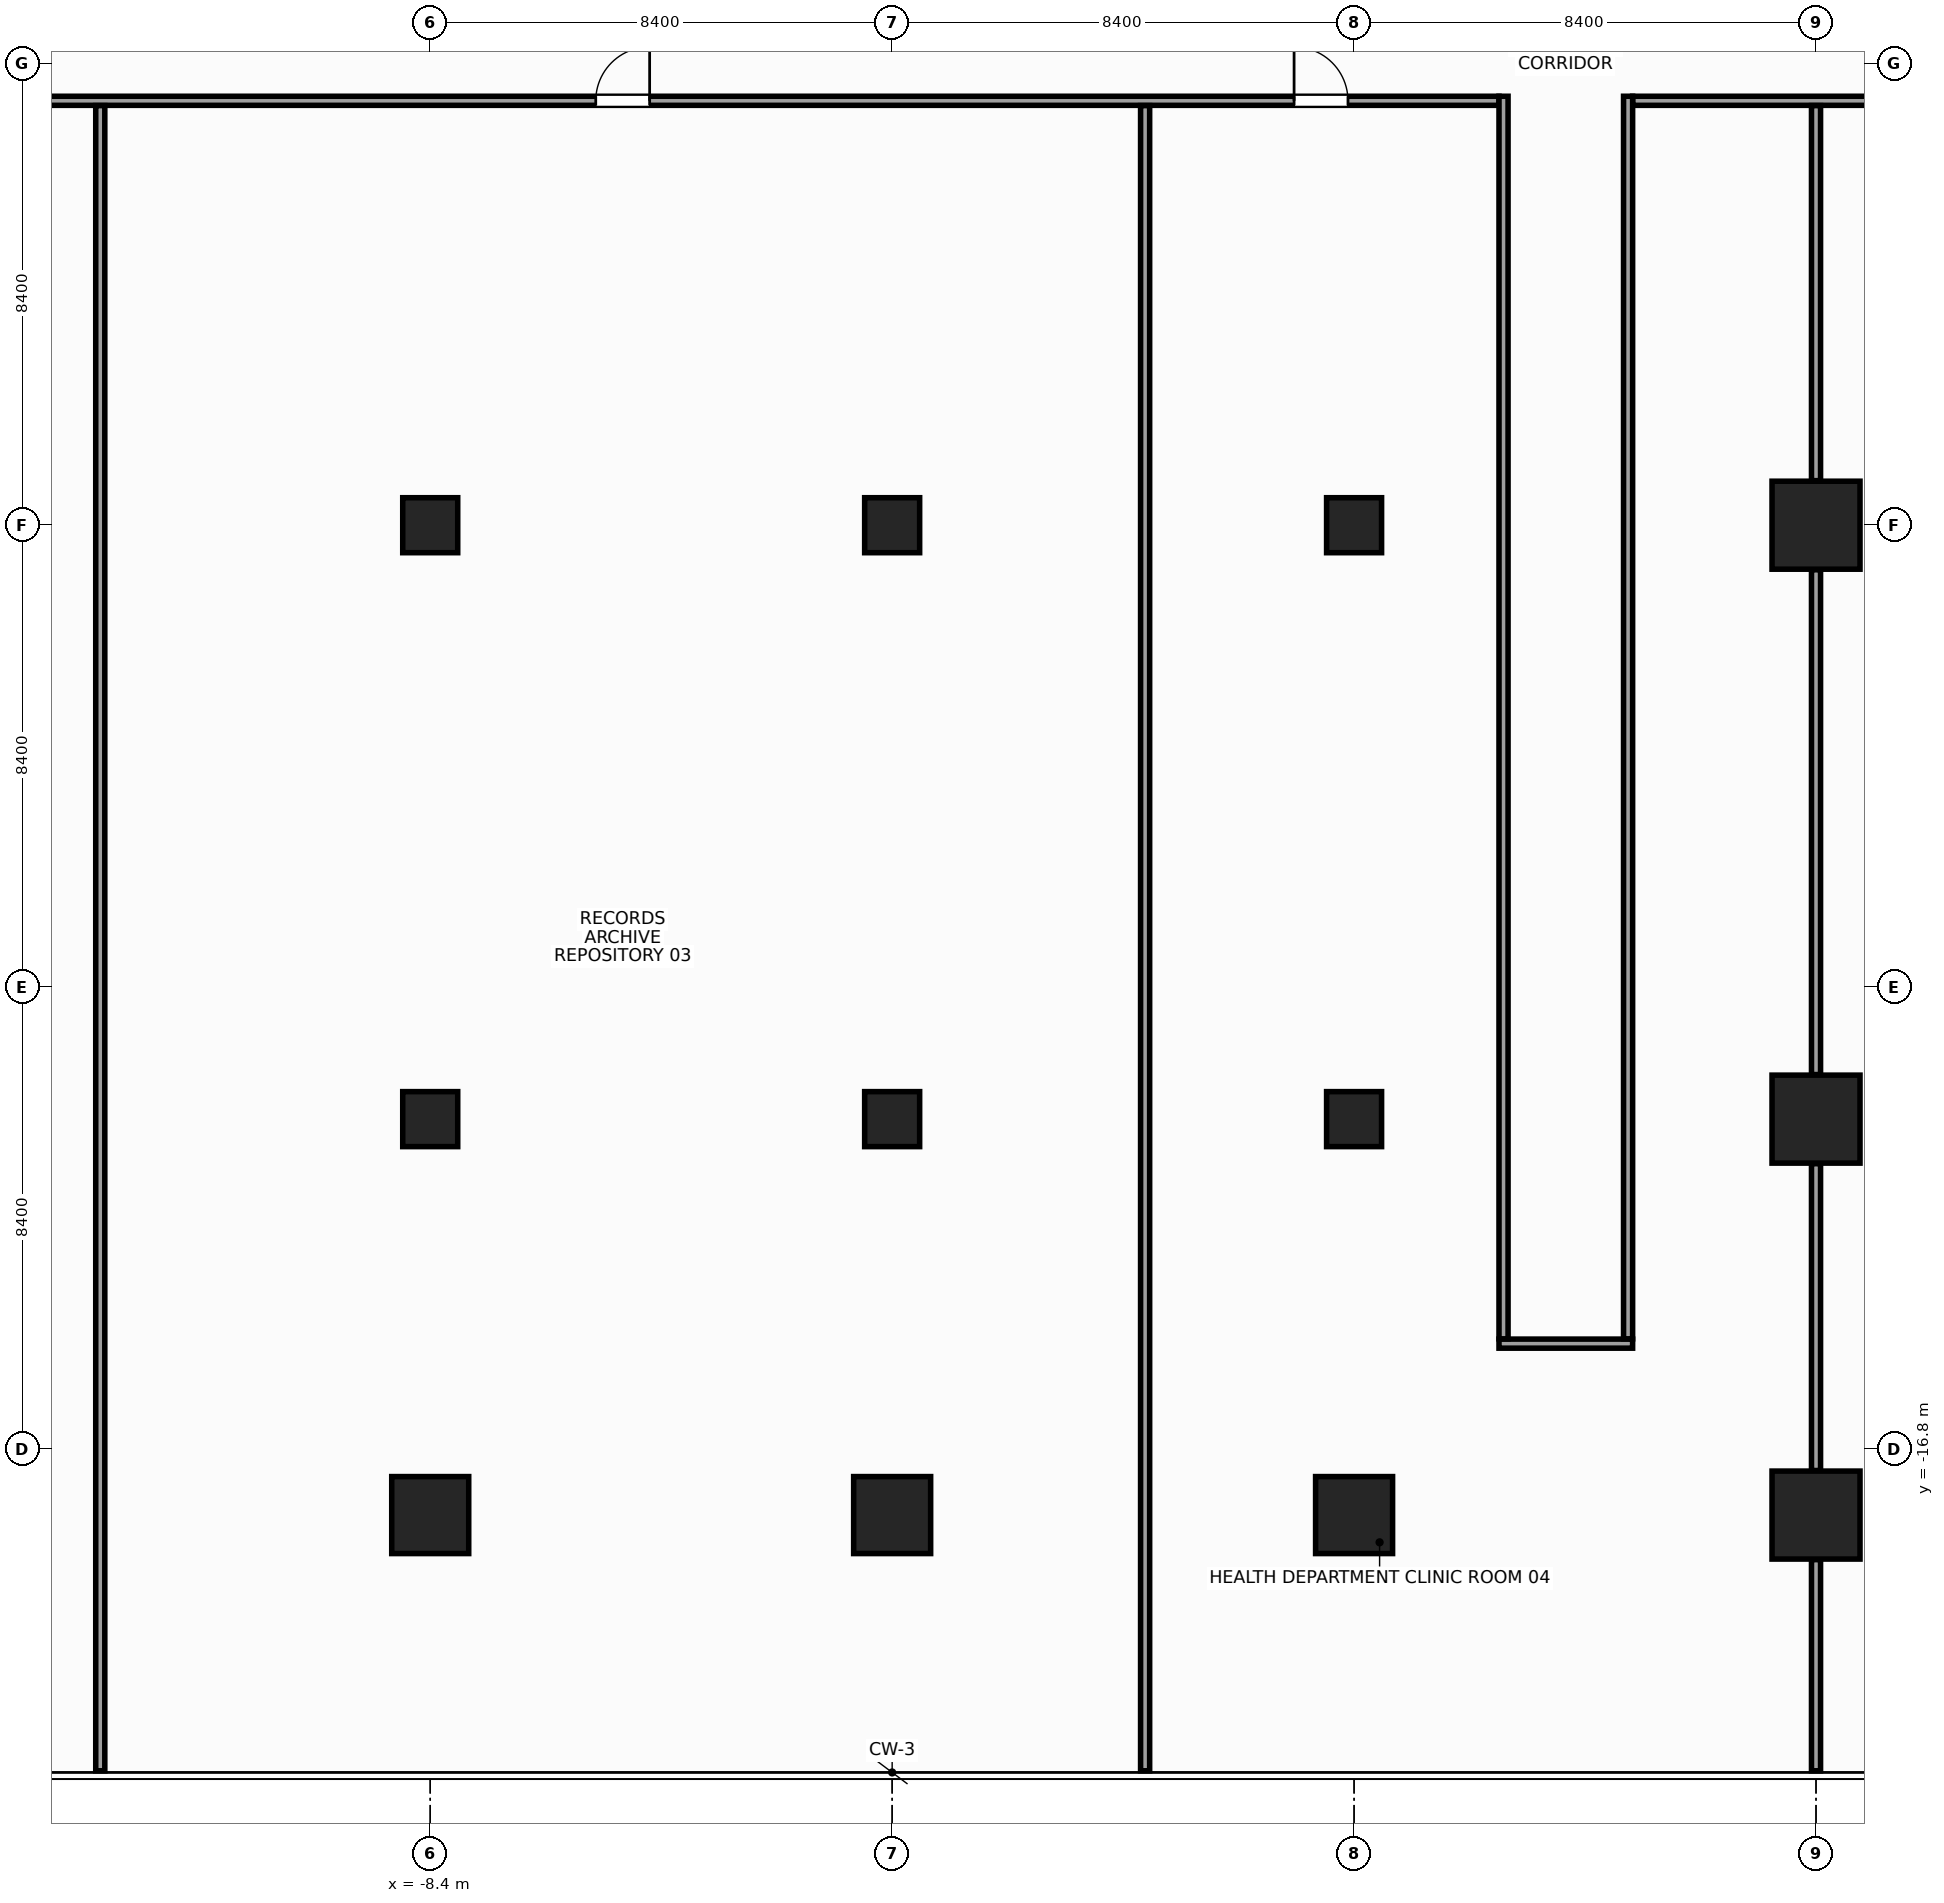
"""IFC4 building model, lengths in metres.
Left out: names, types, materials, properties, quantities, classifications, styles, units other than length and angle.
Written with IfcOpenShell. Run it as: python <this file> out.ifc"""

import sys

from ifc_helpers import new_model, si_unit, direction, frame, frame_2d, origin, origin_2d, place, context, subcontext, project, spatial, rectangle, hollow_rectangle, extrude, source, transform, mapped, element, fill, save


model = new_model("IFC4")
c1 = context("Model", 3, precision=1e-05, world=origin(), true_north=direction((0.0, 1.0)))
c2 = subcontext(c1, "Body", "Model", "MODEL_VIEW")
j1 = project(units=[si_unit("LENGTHUNIT", "METRE"), si_unit("PLANEANGLEUNIT", "RADIAN")], contexts=[c1])
p1 = place(None, origin())
s1 = spatial("IfcSite", under=j1, at=p1, CompositionType="ELEMENT")
p2 = place(p1, origin())
s2 = spatial("IfcBuilding", under=s1, at=p2, CompositionType="ELEMENT")
p3 = place(p2, frame((0.0, 0.0, 156.8)))
s3 = spatial("IfcBuildingStorey", under=s2, at=p3, CompositionType="ELEMENT", Elevation=156.8)
m1 = source(origin(), c2, "Body", "SweptSolid", [
    extrude(rectangle(XDim=1.6, YDim=1.6, at=origin_2d()), origin(), (0.0, 0.0, 1.0), 3.6),
])
for number, where, z_axis, x_axis in (
    (1, (16.8, -18.0, 0.0), (0.0, 0.0, 1.0), (1.0, 0.0, 0.0)),
    (2, (16.8, -10.8, 0.0), (0.0, 0.0, 1.0), (1.0, 0.0, 0.0)),
    (3, (16.8, 0.0, 0.0), (0.0, 0.0, 1.0), (1.0, 0.0, 0.0)),
):
    element("IfcColumn", number, at=place(p3, frame(where, z_axis=z_axis, x_axis=x_axis)), inside=s3, PredefinedType="COLUMN", context=c2, shape_type="MappedRepresentation", body=[
        mapped(m1, transform((0.0, 0.0, 0.0), x_axis=(1.0, 0.0, 0.0), y_axis=(0.0, 1.0, 0.0), z_axis=(0.0, 0.0, 1.0), scale=1.0)),
    ])
m2 = source(origin(), c2, "Body", "SweptSolid", [
    extrude(rectangle(XDim=1.4, YDim=1.4, at=origin_2d()), origin(), (0.0, 0.0, 1.0), 3.6),
])
p4 = place(p3, frame((-8.4, -18.0, 0.0), z_axis=(0.0, 0.0, 1.0), x_axis=(1.0, 0.0, 0.0)))
e4 = element("IfcColumn", 4, at=p4, inside=s3, PredefinedType="COLUMN", context=c2, shape_type="MappedRepresentation", body=[
    mapped(m2, transform((0.0, 0.0, 0.0), x_axis=(1.0, 0.0, 0.0), y_axis=(0.0, 1.0, 0.0), z_axis=(0.0, 0.0, 1.0), scale=1.0)),
])
m3 = source(origin(), c2, "Body", "SweptSolid", [
    extrude(hollow_rectangle(XDim=1.0, YDim=1.0, WallThickness=0.045, at=origin_2d()), origin(), (0.0, 0.0, 1.0), 3.6),
])
for number, where, z_axis, x_axis in (
    (5, (-8.4, 0.0, 0.0), (0.0, 0.0, 1.0), (1.0, 0.0, 0.0)),
    (6, (-8.4, -10.8, 0.0), (0.0, 0.0, 1.0), (1.0, 0.0, 0.0)),
):
    element("IfcColumn", number, at=place(p3, frame(where, z_axis=z_axis, x_axis=x_axis)), inside=s3, PredefinedType="COLUMN", context=c2, shape_type="MappedRepresentation", body=[
        mapped(m3, transform((0.0, 0.0, 0.0), x_axis=(1.0, 0.0, 0.0), y_axis=(0.0, 1.0, 0.0), z_axis=(0.0, 0.0, 1.0), scale=1.0)),
    ])
p5 = place(p3, frame((8.4, -18.0, 0.0), z_axis=(0.0, 0.0, 1.0), x_axis=(1.0, 0.0, 0.0)))
e7 = element("IfcColumn", 7, at=p5, inside=s3, PredefinedType="COLUMN", context=c2, shape_type="MappedRepresentation", body=[
    mapped(m2, transform((0.0, 0.0, 0.0), x_axis=(1.0, 0.0, 0.0), y_axis=(0.0, 1.0, 0.0), z_axis=(0.0, 0.0, 1.0), scale=1.0)),
])
for number, where, z_axis, x_axis in (
    (8, (8.4, 0.0, 0.0), (0.0, 0.0, 1.0), (1.0, 0.0, 0.0)),
    (9, (8.4, -10.8, 0.0), (0.0, 0.0, 1.0), (1.0, 0.0, 0.0)),
):
    element("IfcColumn", number, at=place(p3, frame(where, z_axis=z_axis, x_axis=x_axis)), inside=s3, PredefinedType="COLUMN", context=c2, shape_type="MappedRepresentation", body=[
        mapped(m3, transform((0.0, 0.0, 0.0), x_axis=(1.0, 0.0, 0.0), y_axis=(0.0, 1.0, 0.0), z_axis=(0.0, 0.0, 1.0), scale=1.0)),
    ])
p6 = place(p3, frame((0.0, -18.0, 0.0), z_axis=(0.0, 0.0, 1.0), x_axis=(1.0, 0.0, 0.0)))
e10 = element("IfcColumn", 10, at=p6, inside=s3, PredefinedType="COLUMN", context=c2, shape_type="MappedRepresentation", body=[
    mapped(m2, transform((0.0, 0.0, 0.0), x_axis=(1.0, 0.0, 0.0), y_axis=(0.0, 1.0, 0.0), z_axis=(0.0, 0.0, 1.0), scale=1.0)),
])
m4 = source(origin(), c2, "Body", "SweptSolid", [
    extrude(rectangle(XDim=1.0, YDim=1.0, at=origin_2d()), origin(), (0.0, 0.0, 1.0), 3.6),
])
for number, where, z_axis, x_axis in (
    (11, (0.0, -10.8, 0.0), (0.0, 0.0, 1.0), (1.0, 0.0, 0.0)),
    (12, (0.0, 0.0, 0.0), (0.0, 0.0, 1.0), (1.0, 0.0, 0.0)),
):
    element("IfcColumn", number, at=place(p3, frame(where, z_axis=z_axis, x_axis=x_axis)), inside=s3, PredefinedType="COLUMN", context=c2, shape_type="MappedRepresentation", body=[
        mapped(m4, transform((0.0, 0.0, 0.0), x_axis=(1.0, 0.0, 0.0), y_axis=(0.0, 1.0, 0.0), z_axis=(0.0, 0.0, 1.0), scale=1.0)),
    ])
m5 = source(origin(), c2, "Body", "SweptSolid", [
    extrude(rectangle(XDim=31.6, YDim=0.165, at=frame_2d((15.8, 0.0))), origin(), (0.0, 0.0, 1.0), 2.765),
])
p7 = place(p3, frame((-20.565, 7.718, 0.0), z_axis=(0.0, 0.0, 1.0), x_axis=(1.0, 0.0, 0.0)))
e13 = element("IfcWall", 13, at=p7, inside=s3, PredefinedType="PARTITIONING", context=c2, shape_type="MappedRepresentation", body=[
    mapped(m5, transform((0.0, 0.0, 0.0), x_axis=(1.0, 0.0, 0.0), y_axis=(0.0, 1.0, 0.0), z_axis=(0.0, 0.0, 1.0), scale=1.0)),
])
p8 = place(p7, frame((2.614, 0.0, 0.0)))
e14 = element("IfcOpeningElement", 14, at=p8, cuts=e13, PredefinedType="OPENING", context=c2, shape_type="SweptSolid", body=[
    extrude(rectangle(XDim=0.98, YDim=2.15, at=frame_2d((0.49, 1.075))), frame((0.0, 0.094, 0.0), z_axis=(0.0, -1.0, 0.0), x_axis=(1.0, 0.0, 0.0)), (0.0, 0.0, 1.0), 0.189),
])
p9 = place(p7, frame((15.175, 0.0, 0.0)))
e15 = element("IfcOpeningElement", 15, at=p9, cuts=e13, PredefinedType="OPENING", context=c2, shape_type="SweptSolid", body=[
    extrude(rectangle(XDim=0.98, YDim=2.15, at=frame_2d((0.49, 1.075))), frame((0.0, 0.094, 0.0), z_axis=(0.0, -1.0, 0.0), x_axis=(1.0, 0.0, 0.0)), (0.0, 0.0, 1.0), 0.189),
])
p10 = place(p7, frame((27.874, 0.0, 0.0)))
e16 = element("IfcOpeningElement", 16, at=p10, cuts=e13, PredefinedType="OPENING", context=c2, shape_type="SweptSolid", body=[
    extrude(rectangle(XDim=0.98, YDim=2.15, at=frame_2d((0.49, 1.075))), frame((0.0, 0.094, 0.0), z_axis=(0.0, -1.0, 0.0), x_axis=(1.0, 0.0, 0.0)), (0.0, 0.0, 1.0), 0.189),
])
m6 = source(origin(), c2, "Body", "SweptSolid", [
    extrude(rectangle(XDim=7.1, YDim=0.165, at=frame_2d((3.55, 0.0))), origin(), (0.0, 0.0, 1.0), 2.765),
])
p11 = place(p3, frame((13.465, 7.718, 0.0), z_axis=(0.0, 0.0, 1.0), x_axis=(1.0, 0.0, 0.0)))
e17 = element("IfcWall", 17, at=p11, inside=s3, PredefinedType="PARTITIONING", context=c2, shape_type="MappedRepresentation", body=[
    mapped(m6, transform((0.0, 0.0, 0.0), x_axis=(1.0, 0.0, 0.0), y_axis=(0.0, 1.0, 0.0), z_axis=(0.0, 0.0, 1.0), scale=1.0)),
])
p12 = place(p11, frame((4.706, 0.0, 0.0)))
e18 = element("IfcOpeningElement", 18, at=p12, cuts=e17, PredefinedType="OPENING", context=c2, shape_type="SweptSolid", body=[
    extrude(rectangle(XDim=0.98, YDim=2.15, at=frame_2d((0.49, 1.075))), frame((0.0, 0.094, 0.0), z_axis=(0.0, -1.0, 0.0), x_axis=(1.0, 0.0, 0.0)), (0.0, 0.0, 1.0), 0.189),
])
m7 = source(origin(), c2, "Body", "SweptSolid", [
    extrude(rectangle(XDim=2.43, YDim=0.165, at=frame_2d((1.215, 0.0))), origin(), (0.0, 0.0, 1.0), 3.38),
])
p13 = place(p3, frame((11.035, -14.883, 0.0), z_axis=(0.0, 0.0, 1.0), x_axis=(1.0, 0.0, 0.0)))
e19 = element("IfcWall", 19, at=p13, inside=s3, PredefinedType="PARTITIONING", context=c2, shape_type="MappedRepresentation", body=[
    mapped(m7, transform((0.0, 0.0, 0.0), x_axis=(1.0, 0.0, 0.0), y_axis=(0.0, 1.0, 0.0), z_axis=(0.0, 0.0, 1.0), scale=1.0)),
])
m8 = source(origin(), c2, "Body", "SweptSolid", [
    extrude(rectangle(XDim=22.595, YDim=0.165, at=frame_2d((11.297, 0.0))), origin(), (0.0, 0.0, 1.0), 2.665),
])
for number, where, z_axis, x_axis in (
    (20, (11.117, -14.795, 0.0), (0.0, 0.0, 1.0), (0.0, 1.0, 0.0)),
    (21, (13.383, -14.795, 0.0), (0.0, 0.0, 1.0), (0.0, 1.0, 0.0)),
):
    element("IfcWall", number, at=place(p3, frame(where, z_axis=z_axis, x_axis=x_axis)), inside=s3, PredefinedType="PARTITIONING", context=c2, shape_type="MappedRepresentation", body=[
        mapped(m8, transform((0.0, 0.0, 0.0), x_axis=(1.0, 0.0, 0.0), y_axis=(0.0, 1.0, 0.0), z_axis=(0.0, 0.0, 1.0), scale=1.0)),
    ])
m9 = source(origin(), c2, "Body", "SweptSolid", [
    extrude(rectangle(XDim=30.28, YDim=0.165, at=frame_2d((15.14, 0.0))), origin(), (0.0, 0.0, 1.0), 2.665),
])
for number, where, z_axis, x_axis in (
    (22, (-14.4, -22.65, 0.0), (0.0, 0.0, 1.0), (0.0, 1.0, 0.0)),
    (23, (4.6, -22.65, 0.0), (0.0, 0.0, 1.0), (0.0, 1.0, 0.0)),
):
    element("IfcWall", number, at=place(p3, frame(where, z_axis=z_axis, x_axis=x_axis)), inside=s3, PredefinedType="PARTITIONING", context=c2, shape_type="MappedRepresentation", body=[
        mapped(m9, transform((0.0, 0.0, 0.0), x_axis=(1.0, 0.0, 0.0), y_axis=(0.0, 1.0, 0.0), z_axis=(0.0, 0.0, 1.0), scale=1.0)),
    ])
m10 = source(origin(), c2, "Body", "SweptSolid", [
    extrude(rectangle(XDim=3.84, YDim=0.165, at=frame_2d((1.92, 0.0))), origin(), (0.0, 0.0, 1.0), 3.38),
])
p14 = place(p3, frame((16.8, -22.65, 0.0), z_axis=(0.0, 0.0, 1.0), x_axis=(0.0, 1.0, 0.0)))
e24 = element("IfcWall", 24, at=p14, inside=s3, PredefinedType="PARTITIONING", context=c2, shape_type="MappedRepresentation", body=[
    mapped(m10, transform((0.0, 0.0, 0.0), x_axis=(1.0, 0.0, 0.0), y_axis=(0.0, 1.0, 0.0), z_axis=(0.0, 0.0, 1.0), scale=1.0)),
])
m11 = source(origin(), c2, "Body", "SweptSolid", [
    extrude(rectangle(XDim=5.58, YDim=0.165, at=frame_2d((2.79, 0.0))), origin(), (0.0, 0.0, 1.0), 2.965),
])
p15 = place(p3, frame((16.8, -17.19, 0.0), z_axis=(0.0, 0.0, 1.0), x_axis=(0.0, 1.0, 0.0)))
e25 = element("IfcWall", 25, at=p15, inside=s3, PredefinedType="PARTITIONING", context=c2, shape_type="MappedRepresentation", body=[
    mapped(m11, transform((0.0, 0.0, 0.0), x_axis=(1.0, 0.0, 0.0), y_axis=(0.0, 1.0, 0.0), z_axis=(0.0, 0.0, 1.0), scale=1.0)),
])
m12 = source(origin(), c2, "Body", "SweptSolid", [
    extrude(rectangle(XDim=9.18, YDim=0.165, at=frame_2d((4.59, 0.0))), origin(), (0.0, 0.0, 1.0), 2.765),
])
p16 = place(p3, frame((16.8, -9.99, 0.0), z_axis=(0.0, 0.0, 1.0), x_axis=(0.0, 1.0, 0.0)))
e26 = element("IfcWall", 26, at=p16, inside=s3, PredefinedType="PARTITIONING", context=c2, shape_type="MappedRepresentation", body=[
    mapped(m12, transform((0.0, 0.0, 0.0), x_axis=(1.0, 0.0, 0.0), y_axis=(0.0, 1.0, 0.0), z_axis=(0.0, 0.0, 1.0), scale=1.0)),
])
m13 = source(origin(), c2, "Body", "SweptSolid", [
    extrude(rectangle(XDim=6.82, YDim=0.165, at=frame_2d((3.41, 0.0))), origin(), (0.0, 0.0, 1.0), 2.765),
])
p17 = place(p3, frame((16.8, 0.81, 0.0), z_axis=(0.0, 0.0, 1.0), x_axis=(0.0, 1.0, 0.0)))
e27 = element("IfcWall", 27, at=p17, inside=s3, PredefinedType="PARTITIONING", context=c2, shape_type="MappedRepresentation", body=[
    mapped(m13, transform((0.0, 0.0, 0.0), x_axis=(1.0, 0.0, 0.0), y_axis=(0.0, 1.0, 0.0), z_axis=(0.0, 0.0, 1.0), scale=1.0)),
])
m14 = source(origin(), c2, "Body", "SweptSolid", [
    extrude(rectangle(XDim=0.98, YDim=2.15, at=frame_2d((0.49, 1.075))), frame((0.0, 0.025, 0.0), z_axis=(0.0, -1.0, 0.0), x_axis=(1.0, 0.0, 0.0)), (0.0, 0.0, 1.0), 0.05),
])
p18 = place(p9, origin())
e28 = element("IfcDoor", 28, at=p18, inside=s3, OperationType="SINGLE_SWING_RIGHT", PredefinedType="DOOR", context=c2, shape_type="MappedRepresentation", body=[
    mapped(m14, transform((0.0, 0.0, 0.0), x_axis=(1.0, 0.0, 0.0), y_axis=(0.0, 1.0, 0.0), z_axis=(0.0, 0.0, 1.0), scale=1.0)),
])
fill(e15, e28)
p19 = place(p10, origin())
e29 = element("IfcDoor", 29, at=p19, inside=s3, OperationType="SINGLE_SWING_LEFT", PredefinedType="DOOR", context=c2, shape_type="MappedRepresentation", body=[
    mapped(m14, transform((0.0, 0.0, 0.0), x_axis=(1.0, 0.0, 0.0), y_axis=(0.0, 1.0, 0.0), z_axis=(0.0, 0.0, 1.0), scale=1.0)),
])
fill(e16, e29)
save(model, sys.argv[1])
